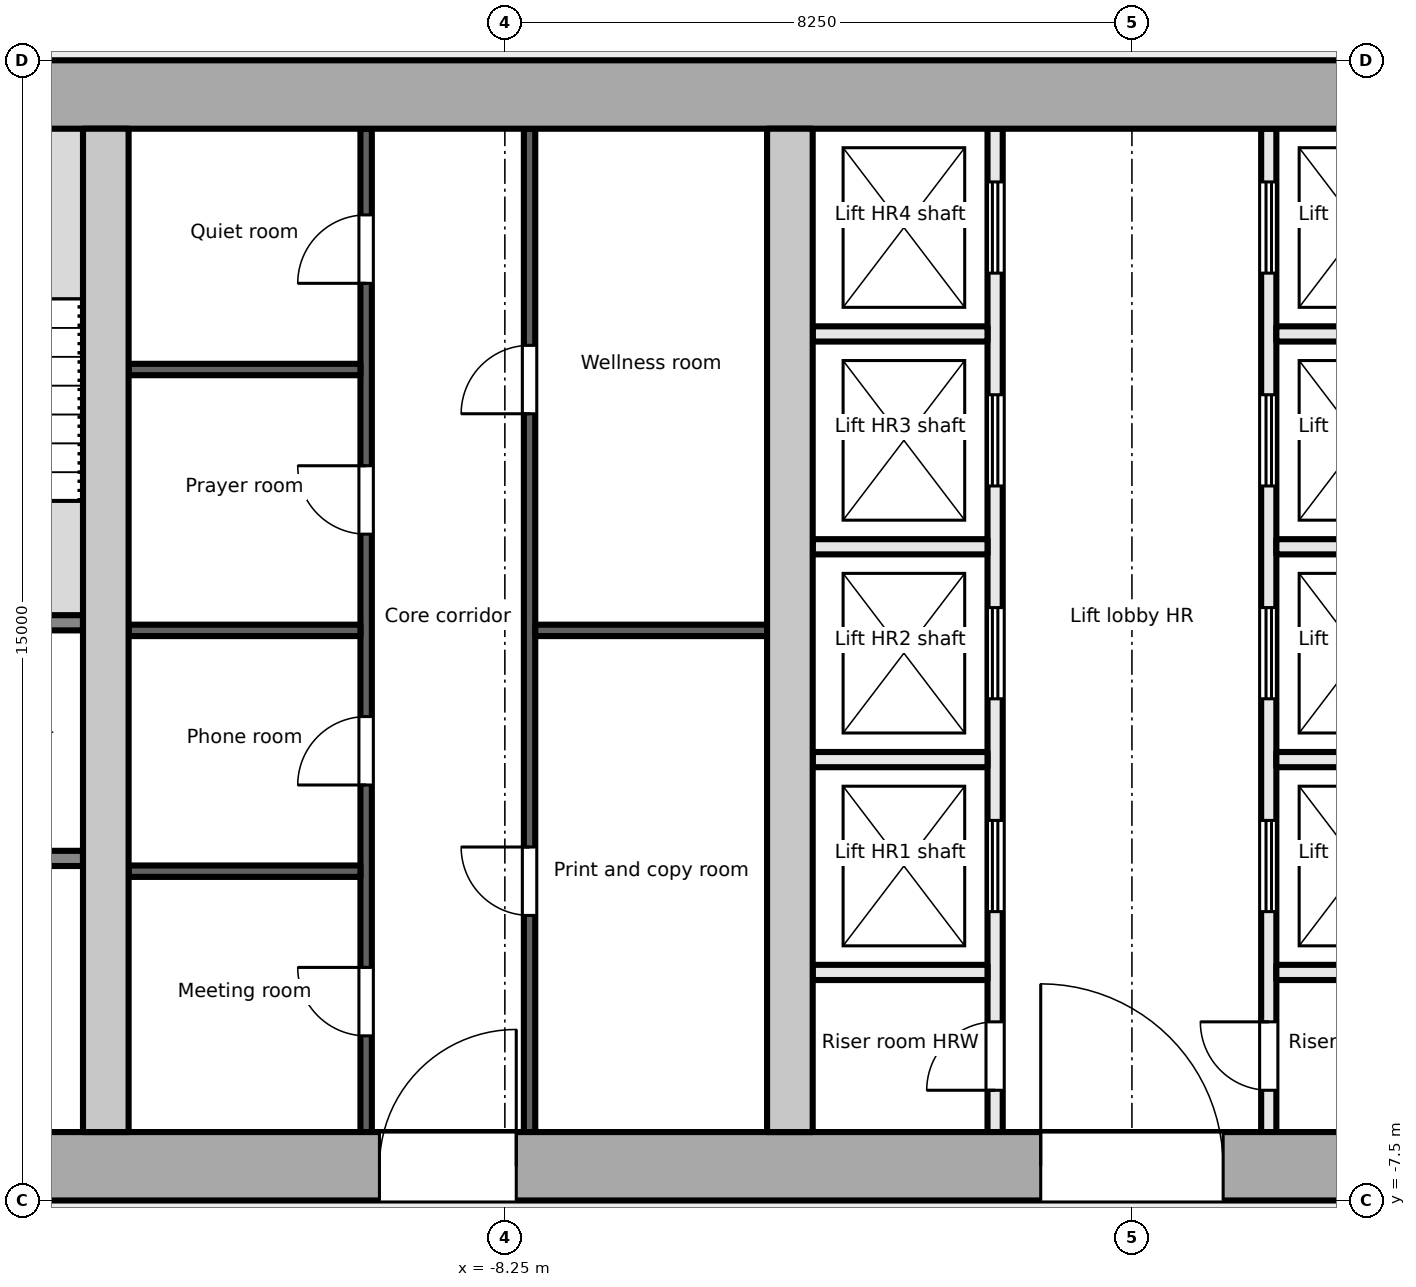
"""IFC4 building model, lengths in metres.
Left out: names, types, materials, properties, quantities, classifications, styles, units other than length and angle.
Written with IfcOpenShell. Run it as: python <this file> out.ifc"""

import sys

from ifc_helpers import new_model, si_unit, direction, frame, frame_2d, origin, place, context, subcontext, project, spatial, rectangle, extrude, element, fill, save


model = new_model("IFC4")
c1 = context("Model", 3, precision=1e-05, world=origin(), true_north=direction((0.0, 1.0)))
c2 = subcontext(c1, "Body", "Model", "MODEL_VIEW")
j1 = project(units=[si_unit("LENGTHUNIT", "METRE"), si_unit("PLANEANGLEUNIT", "RADIAN")], contexts=[c1])
p1 = place(None, origin())
s1 = spatial("IfcSite", under=j1, at=p1, CompositionType="ELEMENT")
p2 = place(p1, origin())
s2 = spatial("IfcBuilding", under=s1, at=p2, CompositionType="ELEMENT")
p3 = place(p2, frame((0.0, 0.0, 208.1)))
s3 = spatial("IfcBuildingStorey", under=s2, at=p3, CompositionType="ELEMENT", Elevation=208.1)
p4 = place(p3, frame((-18.0, -7.05, -0.2), z_axis=(0.0, 0.0, 1.0), x_axis=(1.0, 0.0, 0.0)))
e1 = element("IfcWall", 1, at=p4, inside=s3, PredefinedType="SHEAR", context=c2, shape_type="SweptSolid", body=[
    extrude(rectangle(XDim=36.0, YDim=0.9, at=frame_2d((18.0, 0.0))), origin(), (0.0, 0.0, 1.0), 5.4),
])
p5 = place(p4, frame((8.1, 0.0, 0.2)))
e2 = element("IfcOpeningElement", 2, at=p5, cuts=e1, PredefinedType="OPENING", context=c2, shape_type="SweptSolid", body=[
    extrude(rectangle(XDim=1.8, YDim=2.1, at=frame_2d((0.9, 1.05))), frame((0.0, 0.46, 0.0), z_axis=(0.0, -1.0, 0.0), x_axis=(1.0, 0.0, 0.0)), (0.0, 0.0, 1.0), 0.921),
])
p6 = place(p4, frame((16.8, 0.0, 0.2)))
e3 = element("IfcOpeningElement", 3, at=p6, cuts=e1, PredefinedType="OPENING", context=c2, shape_type="SweptSolid", body=[
    extrude(rectangle(XDim=2.4, YDim=2.1, at=frame_2d((1.2, 1.05))), frame((0.0, 0.46, 0.0), z_axis=(0.0, -1.0, 0.0), x_axis=(1.0, 0.0, 0.0)), (0.0, 0.0, 1.0), 0.921),
])
p7 = place(p4, frame((26.1, 0.0, 0.2)))
e4 = element("IfcOpeningElement", 4, at=p7, cuts=e1, PredefinedType="OPENING", context=c2, shape_type="SweptSolid", body=[
    extrude(rectangle(XDim=2.4, YDim=2.1, at=frame_2d((1.2, 1.05))), frame((0.0, 0.46, 0.0), z_axis=(0.0, -1.0, 0.0), x_axis=(1.0, 0.0, 0.0)), (0.0, 0.0, 1.0), 0.921),
])
p8 = place(p3, frame((-18.0, 7.05, -0.2), z_axis=(0.0, 0.0, 1.0), x_axis=(1.0, 0.0, 0.0)))
e5 = element("IfcWall", 5, at=p8, inside=s3, PredefinedType="SHEAR", context=c2, shape_type="SweptSolid", body=[
    extrude(rectangle(XDim=36.0, YDim=0.9, at=frame_2d((18.0, 0.0))), origin(), (0.0, 0.0, 1.0), 5.4),
])
for number, where, z_axis, x_axis in (
    (6, (-13.5, -6.6, -0.2), (0.0, 0.0, 1.0), (0.0, 1.0, 0.0)),
    (7, (-4.5, -6.6, -0.2), (0.0, 0.0, 1.0), (0.0, 1.0, 0.0)),
):
    element("IfcWall", number, at=place(p3, frame(where, z_axis=z_axis, x_axis=x_axis)), inside=s3, PredefinedType="SHEAR", context=c2, shape_type="SweptSolid", body=[
        extrude(rectangle(XDim=13.2, YDim=0.6, at=frame_2d((6.6, 0.0))), origin(), (0.0, 0.0, 1.0), 5.4),
    ])
p9 = place(p3, frame((-17.1, -3.0, 0.0), z_axis=(0.0, 0.0, 1.0), x_axis=(1.0, 0.0, 0.0)))
e8 = element("IfcWall", 8, at=p9, inside=s3, PredefinedType="PARTITIONING", context=c2, shape_type="SweptSolid", body=[
    extrude(rectangle(XDim=3.3, YDim=0.2, at=frame_2d((1.65, 0.0))), origin(), (0.0, 0.0, 1.0), 5.2),
])
p10 = place(p9, frame((1.1, 0.0, 0.0)))
e9 = element("IfcOpeningElement", 9, at=p10, cuts=e8, PredefinedType="OPENING", context=c2, shape_type="SweptSolid", body=[
    extrude(rectangle(XDim=1.1, YDim=2.1, at=frame_2d((0.55, 1.05))), frame((0.0, 0.111, 0.0), z_axis=(0.0, -1.0, 0.0), x_axis=(1.0, 0.0, 0.0)), (0.0, 0.0, 1.0), 0.221),
])
p11 = place(p3, frame((-17.1, 0.1, 0.0), z_axis=(0.0, 0.0, 1.0), x_axis=(1.0, 0.0, 0.0)))
e10 = element("IfcWall", 10, at=p11, inside=s3, PredefinedType="PARTITIONING", context=c2, shape_type="SweptSolid", body=[
    extrude(rectangle(XDim=3.3, YDim=0.2, at=frame_2d((1.65, 0.0))), origin(), (0.0, 0.0, 1.0), 5.2),
])
p12 = place(p11, frame((1.1, 0.0, 0.0)))
e11 = element("IfcOpeningElement", 11, at=p12, cuts=e10, PredefinedType="OPENING", context=c2, shape_type="SweptSolid", body=[
    extrude(rectangle(XDim=1.1, YDim=2.1, at=frame_2d((0.55, 1.05))), frame((0.0, 0.111, 0.0), z_axis=(0.0, -1.0, 0.0), x_axis=(1.0, 0.0, 0.0)), (0.0, 0.0, 1.0), 0.221),
])
p13 = place(p3, frame((-10.075, -6.6, 0.0), z_axis=(0.0, 0.0, 1.0), x_axis=(0.0, 1.0, 0.0)))
e12 = element("IfcWall", 12, at=p13, inside=s3, PredefinedType="PARTITIONING", context=c2, shape_type="SweptSolid", body=[
    extrude(rectangle(XDim=13.2, YDim=0.15, at=frame_2d((6.6, 0.0))), origin(), (0.0, 0.0, 1.0), 5.2),
])
p14 = place(p13, frame((1.266, 0.0, 0.0)))
e13 = element("IfcOpeningElement", 13, at=p14, cuts=e12, PredefinedType="OPENING", context=c2, shape_type="SweptSolid", body=[
    extrude(rectangle(XDim=0.9, YDim=2.1, at=frame_2d((0.45, 1.05))), frame((0.0, 0.085, 0.0), z_axis=(0.0, -1.0, 0.0), x_axis=(1.0, 0.0, 0.0)), (0.0, 0.0, 1.0), 0.171),
])
p15 = place(p13, frame((4.566, 0.0, 0.0)))
e14 = element("IfcOpeningElement", 14, at=p15, cuts=e12, PredefinedType="OPENING", context=c2, shape_type="SweptSolid", body=[
    extrude(rectangle(XDim=0.9, YDim=2.1, at=frame_2d((0.45, 1.05))), frame((0.0, 0.085, 0.0), z_axis=(0.0, -1.0, 0.0), x_axis=(1.0, 0.0, 0.0)), (0.0, 0.0, 1.0), 0.171),
])
p16 = place(p13, frame((7.866, 0.0, 0.0)))
e15 = element("IfcOpeningElement", 15, at=p16, cuts=e12, PredefinedType="OPENING", context=c2, shape_type="SweptSolid", body=[
    extrude(rectangle(XDim=0.9, YDim=2.1, at=frame_2d((0.45, 1.05))), frame((0.0, 0.085, 0.0), z_axis=(0.0, -1.0, 0.0), x_axis=(1.0, 0.0, 0.0)), (0.0, 0.0, 1.0), 0.171),
])
p17 = place(p13, frame((11.166, 0.0, 0.0)))
e16 = element("IfcOpeningElement", 16, at=p17, cuts=e12, PredefinedType="OPENING", context=c2, shape_type="SweptSolid", body=[
    extrude(rectangle(XDim=0.9, YDim=2.1, at=frame_2d((0.45, 1.05))), frame((0.0, 0.085, 0.0), z_axis=(0.0, -1.0, 0.0), x_axis=(1.0, 0.0, 0.0)), (0.0, 0.0, 1.0), 0.171),
])
for number, where, z_axis, x_axis in (
    (17, (-13.2, -3.168, 0.0), (0.0, 0.0, 1.0), (1.0, 0.0, 0.0)),
    (18, (-13.2, 0.0, 0.0), (0.0, 0.0, 1.0), (1.0, 0.0, 0.0)),
    (19, (-13.2, 3.432, 0.0), (0.0, 0.0, 1.0), (1.0, 0.0, 0.0)),
):
    element("IfcWall", number, at=place(p3, frame(where, z_axis=z_axis, x_axis=x_axis)), inside=s3, PredefinedType="PARTITIONING", context=c2, shape_type="SweptSolid", body=[
        extrude(rectangle(XDim=3.05, YDim=0.15, at=frame_2d((1.525, 0.0))), origin(), (0.0, 0.0, 1.0), 5.2),
    ])
p18 = place(p3, frame((-7.925, -6.6, 0.0), z_axis=(0.0, 0.0, 1.0), x_axis=(0.0, 1.0, 0.0)))
e20 = element("IfcWall", 20, at=p18, inside=s3, PredefinedType="PARTITIONING", context=c2, shape_type="SweptSolid", body=[
    extrude(rectangle(XDim=13.2, YDim=0.15, at=frame_2d((6.6, 0.0))), origin(), (0.0, 0.0, 1.0), 5.2),
])
p19 = place(p18, frame((2.85, 0.0, 0.0)))
e21 = element("IfcOpeningElement", 21, at=p19, cuts=e20, PredefinedType="OPENING", context=c2, shape_type="SweptSolid", body=[
    extrude(rectangle(XDim=0.9, YDim=2.1, at=frame_2d((0.45, 1.05))), frame((0.0, 0.085, 0.0), z_axis=(0.0, -1.0, 0.0), x_axis=(1.0, 0.0, 0.0)), (0.0, 0.0, 1.0), 0.171),
])
p20 = place(p18, frame((9.45, 0.0, 0.0)))
e22 = element("IfcOpeningElement", 22, at=p20, cuts=e20, PredefinedType="OPENING", context=c2, shape_type="SweptSolid", body=[
    extrude(rectangle(XDim=0.9, YDim=2.1, at=frame_2d((0.45, 1.05))), frame((0.0, 0.085, 0.0), z_axis=(0.0, -1.0, 0.0), x_axis=(1.0, 0.0, 0.0)), (0.0, 0.0, 1.0), 0.171),
])
p21 = place(p3, frame((-7.85, 0.0, 0.0), z_axis=(0.0, 0.0, 1.0), x_axis=(1.0, 0.0, 0.0)))
e23 = element("IfcWall", 23, at=p21, inside=s3, PredefinedType="PARTITIONING", context=c2, shape_type="SweptSolid", body=[
    extrude(rectangle(XDim=3.05, YDim=0.15, at=frame_2d((1.525, 0.0))), origin(), (0.0, 0.0, 1.0), 5.2),
])
p22 = place(p3, frame((-1.8, -6.6, 0.0), z_axis=(0.0, 0.0, 1.0), x_axis=(0.0, 1.0, 0.0)))
e24 = element("IfcWall", 24, at=p22, inside=s3, PredefinedType="PARTITIONING", context=c2, shape_type="SweptSolid", body=[
    extrude(rectangle(XDim=13.2, YDim=0.2, at=frame_2d((6.6, 0.0))), origin(), (0.0, 0.0, 1.0), 5.2),
])
p23 = place(p22, frame((0.55, 0.0, 0.0)))
e25 = element("IfcOpeningElement", 25, at=p23, cuts=e24, PredefinedType="OPENING", context=c2, shape_type="SweptSolid", body=[
    extrude(rectangle(XDim=0.9, YDim=2.1, at=frame_2d((0.45, 1.05))), frame((0.0, 0.111, 0.0), z_axis=(0.0, -1.0, 0.0), x_axis=(1.0, 0.0, 0.0)), (0.0, 0.0, 1.0), 0.221),
])
p24 = place(p22, frame((2.9, 0.0, 0.0)))
e26 = element("IfcOpeningElement", 26, at=p24, cuts=e24, PredefinedType="OPENING", context=c2, shape_type="SweptSolid", body=[
    extrude(rectangle(XDim=1.2, YDim=2.1, at=frame_2d((0.6, 1.05))), frame((0.0, 0.111, 0.0), z_axis=(0.0, -1.0, 0.0), x_axis=(1.0, 0.0, 0.0)), (0.0, 0.0, 1.0), 0.221),
])
p25 = place(p22, frame((5.7, 0.0, 0.0)))
e27 = element("IfcOpeningElement", 27, at=p25, cuts=e24, PredefinedType="OPENING", context=c2, shape_type="SweptSolid", body=[
    extrude(rectangle(XDim=1.2, YDim=2.1, at=frame_2d((0.6, 1.05))), frame((0.0, 0.111, 0.0), z_axis=(0.0, -1.0, 0.0), x_axis=(1.0, 0.0, 0.0)), (0.0, 0.0, 1.0), 0.221),
])
p26 = place(p22, frame((8.5, 0.0, 0.0)))
e28 = element("IfcOpeningElement", 28, at=p26, cuts=e24, PredefinedType="OPENING", context=c2, shape_type="SweptSolid", body=[
    extrude(rectangle(XDim=1.2, YDim=2.1, at=frame_2d((0.6, 1.05))), frame((0.0, 0.111, 0.0), z_axis=(0.0, -1.0, 0.0), x_axis=(1.0, 0.0, 0.0)), (0.0, 0.0, 1.0), 0.221),
])
p27 = place(p22, frame((11.3, 0.0, 0.0)))
e29 = element("IfcOpeningElement", 29, at=p27, cuts=e24, PredefinedType="OPENING", context=c2, shape_type="SweptSolid", body=[
    extrude(rectangle(XDim=1.2, YDim=2.1, at=frame_2d((0.6, 1.05))), frame((0.0, 0.111, 0.0), z_axis=(0.0, -1.0, 0.0), x_axis=(1.0, 0.0, 0.0)), (0.0, 0.0, 1.0), 0.221),
])
p28 = place(p3, frame((1.8, -6.6, 0.0), z_axis=(0.0, 0.0, 1.0), x_axis=(0.0, 1.0, 0.0)))
e30 = element("IfcWall", 30, at=p28, inside=s3, PredefinedType="PARTITIONING", context=c2, shape_type="SweptSolid", body=[
    extrude(rectangle(XDim=13.2, YDim=0.2, at=frame_2d((6.6, 0.0))), origin(), (0.0, 0.0, 1.0), 5.2),
])
p29 = place(p28, frame((0.55, 0.0, 0.0)))
e31 = element("IfcOpeningElement", 31, at=p29, cuts=e30, PredefinedType="OPENING", context=c2, shape_type="SweptSolid", body=[
    extrude(rectangle(XDim=0.9, YDim=2.1, at=frame_2d((0.45, 1.05))), frame((0.0, 0.111, 0.0), z_axis=(0.0, -1.0, 0.0), x_axis=(1.0, 0.0, 0.0)), (0.0, 0.0, 1.0), 0.221),
])
p30 = place(p28, frame((2.9, 0.0, 0.0)))
e32 = element("IfcOpeningElement", 32, at=p30, cuts=e30, PredefinedType="OPENING", context=c2, shape_type="SweptSolid", body=[
    extrude(rectangle(XDim=1.2, YDim=2.1, at=frame_2d((0.6, 1.05))), frame((0.0, 0.111, 0.0), z_axis=(0.0, -1.0, 0.0), x_axis=(1.0, 0.0, 0.0)), (0.0, 0.0, 1.0), 0.221),
])
p31 = place(p28, frame((5.7, 0.0, 0.0)))
e33 = element("IfcOpeningElement", 33, at=p31, cuts=e30, PredefinedType="OPENING", context=c2, shape_type="SweptSolid", body=[
    extrude(rectangle(XDim=1.2, YDim=2.1, at=frame_2d((0.6, 1.05))), frame((0.0, 0.111, 0.0), z_axis=(0.0, -1.0, 0.0), x_axis=(1.0, 0.0, 0.0)), (0.0, 0.0, 1.0), 0.221),
])
p32 = place(p28, frame((8.5, 0.0, 0.0)))
e34 = element("IfcOpeningElement", 34, at=p32, cuts=e30, PredefinedType="OPENING", context=c2, shape_type="SweptSolid", body=[
    extrude(rectangle(XDim=1.2, YDim=2.1, at=frame_2d((0.6, 1.05))), frame((0.0, 0.111, 0.0), z_axis=(0.0, -1.0, 0.0), x_axis=(1.0, 0.0, 0.0)), (0.0, 0.0, 1.0), 0.221),
])
p33 = place(p28, frame((11.3, 0.0, 0.0)))
e35 = element("IfcOpeningElement", 35, at=p33, cuts=e30, PredefinedType="OPENING", context=c2, shape_type="SweptSolid", body=[
    extrude(rectangle(XDim=1.2, YDim=2.1, at=frame_2d((0.6, 1.05))), frame((0.0, 0.111, 0.0), z_axis=(0.0, -1.0, 0.0), x_axis=(1.0, 0.0, 0.0)), (0.0, 0.0, 1.0), 0.221),
])
for number, where, z_axis, x_axis in (
    (36, (-4.2, -1.7, 0.0), (0.0, 0.0, 1.0), (1.0, 0.0, 0.0)),
    (37, (-4.2, 1.1, 0.0), (0.0, 0.0, 1.0), (1.0, 0.0, 0.0)),
    (38, (-4.2, 3.9, 0.0), (0.0, 0.0, 1.0), (1.0, 0.0, 0.0)),
    (39, (-4.2, -4.5, 0.0), (0.0, 0.0, 1.0), (1.0, 0.0, 0.0)),
    (40, (1.9, -1.7, 0.0), (0.0, 0.0, 1.0), (1.0, 0.0, 0.0)),
    (41, (1.9, 1.1, 0.0), (0.0, 0.0, 1.0), (1.0, 0.0, 0.0)),
    (42, (1.9, 3.9, 0.0), (0.0, 0.0, 1.0), (1.0, 0.0, 0.0)),
    (43, (1.9, -4.5, 0.0), (0.0, 0.0, 1.0), (1.0, 0.0, 0.0)),
):
    element("IfcWall", number, at=place(p3, frame(where, z_axis=z_axis, x_axis=x_axis)), inside=s3, PredefinedType="PARTITIONING", context=c2, shape_type="SweptSolid", body=[
        extrude(rectangle(XDim=2.3, YDim=0.2, at=frame_2d((1.15, 0.0))), origin(), (0.0, 0.0, 1.0), 5.2),
    ])
p34 = place(p14, origin())
e44 = element("IfcDoor", 44, at=p34, inside=s3, OperationType="SINGLE_SWING_RIGHT", PredefinedType="DOOR", context=c2, shape_type="SweptSolid", body=[
    extrude(rectangle(XDim=0.9, YDim=2.1, at=frame_2d((0.45, 1.05))), frame((0.0, 0.025, 0.0), z_axis=(0.0, -1.0, 0.0), x_axis=(1.0, 0.0, 0.0)), (0.0, 0.0, 1.0), 0.05),
])
fill(e13, e44)
p35 = place(p15, origin())
e45 = element("IfcDoor", 45, at=p35, inside=s3, OperationType="SINGLE_SWING_LEFT", PredefinedType="DOOR", context=c2, shape_type="SweptSolid", body=[
    extrude(rectangle(XDim=0.9, YDim=2.1, at=frame_2d((0.45, 1.05))), frame((0.0, 0.025, 0.0), z_axis=(0.0, -1.0, 0.0), x_axis=(1.0, 0.0, 0.0)), (0.0, 0.0, 1.0), 0.05),
])
fill(e14, e45)
p36 = place(p16, origin())
e46 = element("IfcDoor", 46, at=p36, inside=s3, OperationType="SINGLE_SWING_RIGHT", PredefinedType="DOOR", context=c2, shape_type="SweptSolid", body=[
    extrude(rectangle(XDim=0.9, YDim=2.1, at=frame_2d((0.45, 1.05))), frame((0.0, 0.025, 0.0), z_axis=(0.0, -1.0, 0.0), x_axis=(1.0, 0.0, 0.0)), (0.0, 0.0, 1.0), 0.05),
])
fill(e15, e46)
p37 = place(p17, origin())
e47 = element("IfcDoor", 47, at=p37, inside=s3, OperationType="SINGLE_SWING_LEFT", PredefinedType="DOOR", context=c2, shape_type="SweptSolid", body=[
    extrude(rectangle(XDim=0.9, YDim=2.1, at=frame_2d((0.45, 1.05))), frame((0.0, 0.025, 0.0), z_axis=(0.0, -1.0, 0.0), x_axis=(1.0, 0.0, 0.0)), (0.0, 0.0, 1.0), 0.05),
])
fill(e16, e47)
p38 = place(p19, origin())
e48 = element("IfcDoor", 48, at=p38, inside=s3, OperationType="SINGLE_SWING_RIGHT", PredefinedType="DOOR", context=c2, shape_type="SweptSolid", body=[
    extrude(rectangle(XDim=0.9, YDim=2.1, at=frame_2d((0.45, 1.05))), frame((0.0, 0.025, 0.0), z_axis=(0.0, -1.0, 0.0), x_axis=(1.0, 0.0, 0.0)), (0.0, 0.0, 1.0), 0.05),
])
fill(e21, e48)
p39 = place(p20, origin())
e49 = element("IfcDoor", 49, at=p39, inside=s3, OperationType="SINGLE_SWING_LEFT", PredefinedType="DOOR", context=c2, shape_type="SweptSolid", body=[
    extrude(rectangle(XDim=0.9, YDim=2.1, at=frame_2d((0.45, 1.05))), frame((0.0, 0.025, 0.0), z_axis=(0.0, -1.0, 0.0), x_axis=(1.0, 0.0, 0.0)), (0.0, 0.0, 1.0), 0.05),
])
fill(e22, e49)
p40 = place(p5, origin())
e50 = element("IfcDoor", 50, at=p40, inside=s3, OperationType="SINGLE_SWING_RIGHT", PredefinedType="DOOR", context=c2, shape_type="SweptSolid", body=[
    extrude(rectangle(XDim=1.8, YDim=2.1, at=frame_2d((0.9, 1.05))), frame((0.0, 0.025, 0.0), z_axis=(0.0, -1.0, 0.0), x_axis=(1.0, 0.0, 0.0)), (0.0, 0.0, 1.0), 0.05),
])
fill(e2, e50)
p41 = place(p23, origin())
e51 = element("IfcDoor", 51, at=p41, inside=s3, OperationType="SINGLE_SWING_LEFT", PredefinedType="DOOR", context=c2, shape_type="SweptSolid", body=[
    extrude(rectangle(XDim=0.9, YDim=2.1, at=frame_2d((0.45, 1.05))), frame((0.0, 0.025, 0.0), z_axis=(0.0, -1.0, 0.0), x_axis=(1.0, 0.0, 0.0)), (0.0, 0.0, 1.0), 0.05),
])
fill(e25, e51)
p42 = place(p24, origin())
e52 = element("IfcDoor", 52, at=p42, inside=s3, OperationType="DOUBLE_DOOR_SLIDING", PredefinedType="DOOR", context=c2, shape_type="SweptSolid", body=[
    extrude(rectangle(XDim=1.2, YDim=2.1, at=frame_2d((0.6, 1.05))), frame((0.0, 0.025, 0.0), z_axis=(0.0, -1.0, 0.0), x_axis=(1.0, 0.0, 0.0)), (0.0, 0.0, 1.0), 0.05),
])
fill(e26, e52)
p43 = place(p25, origin())
e53 = element("IfcDoor", 53, at=p43, inside=s3, OperationType="DOUBLE_DOOR_SLIDING", PredefinedType="DOOR", context=c2, shape_type="SweptSolid", body=[
    extrude(rectangle(XDim=1.2, YDim=2.1, at=frame_2d((0.6, 1.05))), frame((0.0, 0.025, 0.0), z_axis=(0.0, -1.0, 0.0), x_axis=(1.0, 0.0, 0.0)), (0.0, 0.0, 1.0), 0.05),
])
fill(e27, e53)
p44 = place(p26, origin())
e54 = element("IfcDoor", 54, at=p44, inside=s3, OperationType="DOUBLE_DOOR_SLIDING", PredefinedType="DOOR", context=c2, shape_type="SweptSolid", body=[
    extrude(rectangle(XDim=1.2, YDim=2.1, at=frame_2d((0.6, 1.05))), frame((0.0, 0.025, 0.0), z_axis=(0.0, -1.0, 0.0), x_axis=(1.0, 0.0, 0.0)), (0.0, 0.0, 1.0), 0.05),
])
fill(e28, e54)
p45 = place(p27, origin())
e55 = element("IfcDoor", 55, at=p45, inside=s3, OperationType="DOUBLE_DOOR_SLIDING", PredefinedType="DOOR", context=c2, shape_type="SweptSolid", body=[
    extrude(rectangle(XDim=1.2, YDim=2.1, at=frame_2d((0.6, 1.05))), frame((0.0, 0.025, 0.0), z_axis=(0.0, -1.0, 0.0), x_axis=(1.0, 0.0, 0.0)), (0.0, 0.0, 1.0), 0.05),
])
fill(e29, e55)
p46 = place(p29, origin())
e56 = element("IfcDoor", 56, at=p46, inside=s3, OperationType="SINGLE_SWING_RIGHT", PredefinedType="DOOR", context=c2, shape_type="SweptSolid", body=[
    extrude(rectangle(XDim=0.9, YDim=2.1, at=frame_2d((0.45, 1.05))), frame((0.0, 0.025, 0.0), z_axis=(0.0, -1.0, 0.0), x_axis=(1.0, 0.0, 0.0)), (0.0, 0.0, 1.0), 0.05),
])
fill(e31, e56)
p47 = place(p30, origin())
e57 = element("IfcDoor", 57, at=p47, inside=s3, OperationType="DOUBLE_DOOR_SLIDING", PredefinedType="DOOR", context=c2, shape_type="SweptSolid", body=[
    extrude(rectangle(XDim=1.2, YDim=2.1, at=frame_2d((0.6, 1.05))), frame((0.0, 0.025, 0.0), z_axis=(0.0, -1.0, 0.0), x_axis=(1.0, 0.0, 0.0)), (0.0, 0.0, 1.0), 0.05),
])
fill(e32, e57)
p48 = place(p31, origin())
e58 = element("IfcDoor", 58, at=p48, inside=s3, OperationType="DOUBLE_DOOR_SLIDING", PredefinedType="DOOR", context=c2, shape_type="SweptSolid", body=[
    extrude(rectangle(XDim=1.2, YDim=2.1, at=frame_2d((0.6, 1.05))), frame((0.0, 0.025, 0.0), z_axis=(0.0, -1.0, 0.0), x_axis=(1.0, 0.0, 0.0)), (0.0, 0.0, 1.0), 0.05),
])
fill(e33, e58)
p49 = place(p32, origin())
e59 = element("IfcDoor", 59, at=p49, inside=s3, OperationType="DOUBLE_DOOR_SLIDING", PredefinedType="DOOR", context=c2, shape_type="SweptSolid", body=[
    extrude(rectangle(XDim=1.2, YDim=2.1, at=frame_2d((0.6, 1.05))), frame((0.0, 0.025, 0.0), z_axis=(0.0, -1.0, 0.0), x_axis=(1.0, 0.0, 0.0)), (0.0, 0.0, 1.0), 0.05),
])
fill(e34, e59)
p50 = place(p33, origin())
e60 = element("IfcDoor", 60, at=p50, inside=s3, OperationType="DOUBLE_DOOR_SLIDING", PredefinedType="DOOR", context=c2, shape_type="SweptSolid", body=[
    extrude(rectangle(XDim=1.2, YDim=2.1, at=frame_2d((0.6, 1.05))), frame((0.0, 0.025, 0.0), z_axis=(0.0, -1.0, 0.0), x_axis=(1.0, 0.0, 0.0)), (0.0, 0.0, 1.0), 0.05),
])
fill(e35, e60)
p51 = place(p6, origin())
e61 = element("IfcDoor", 61, at=p51, inside=s3, OperationType="DOUBLE_DOOR_DOUBLE_SWING", PredefinedType="DOOR", context=c2, shape_type="SweptSolid", body=[
    extrude(rectangle(XDim=2.4, YDim=2.1, at=frame_2d((1.2, 1.05))), frame((0.0, 0.025, 0.0), z_axis=(0.0, -1.0, 0.0), x_axis=(1.0, 0.0, 0.0)), (0.0, 0.0, 1.0), 0.05),
])
fill(e3, e61)
save(model, sys.argv[1])
